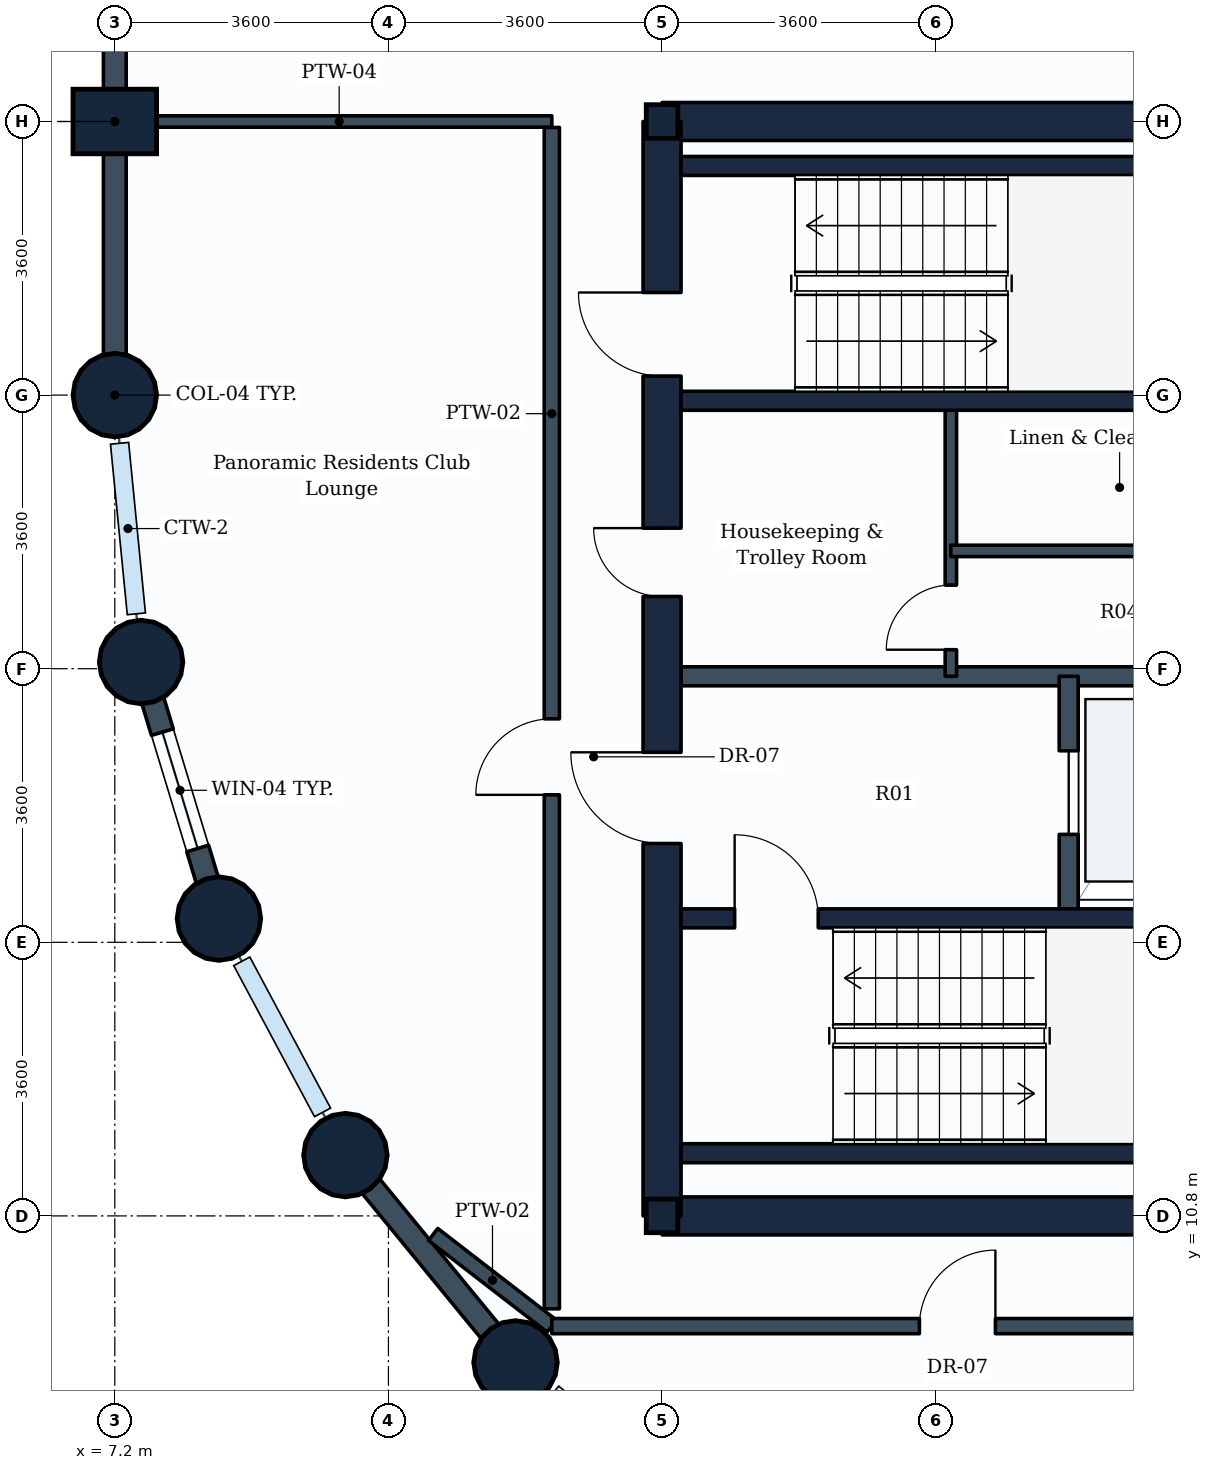
"""IFC4 building model, lengths in metres.
Left out: names, types, materials, properties, quantities, classifications, styles, units other than length and angle.
Written with IfcOpenShell. Run it as: python <this file> out.ifc"""

import sys

from ifc_helpers import new_model, si_unit, direction, frame, frame_2d, origin, origin_2d, place, context, subcontext, project, spatial, rectangle, circle, i_section, extrude, element, fill, save


model = new_model("IFC4")
c1 = context("Model", 3, precision=1e-05, world=origin(), true_north=direction((0.0, 1.0)))
c2 = subcontext(c1, "Body", "Model", "MODEL_VIEW")
j1 = project(units=[si_unit("LENGTHUNIT", "METRE"), si_unit("PLANEANGLEUNIT", "RADIAN")], contexts=[c1])
p1 = place(None, origin())
s1 = spatial("IfcSite", under=j1, at=p1, CompositionType="ELEMENT")
p2 = place(p1, origin())
s2 = spatial("IfcBuilding", under=s1, at=p2, CompositionType="ELEMENT")
p3 = place(p2, frame((0.0, 0.0, 123.8)))
s3 = spatial("IfcBuildingStorey", under=s2, at=p3, CompositionType="ELEMENT", Elevation=123.8)
p4 = place(p3, frame((7.2, 21.6, 0.0), z_axis=(0.0, 0.0, 1.0), x_axis=(1.0, 0.0, 0.0)))
e1 = element("IfcColumn", 1, at=p4, inside=s3, PredefinedType="COLUMN", context=c2, shape_type="SweptSolid", body=[
    extrude(circle(Radius=0.55, at=origin_2d()), origin(), (0.0, 0.0, 1.0), 3.8),
])
p5 = place(p3, frame((7.2, 25.2, 0.0), z_axis=(0.0, 0.0, 1.0), x_axis=(0.0, 1.0, 0.0)))
e2 = element("IfcColumn", 2, at=p5, inside=s3, PredefinedType="COLUMN", context=c2, shape_type="SweptSolid", body=[
    extrude(rectangle(XDim=0.85, YDim=1.1, at=origin_2d()), origin(), (0.0, 0.0, 1.0), 3.8),
])
for number, where, z_axis, x_axis in (
    (3, (7.546, 18.088, 0.0), (0.0, 0.0, 1.0), (1.0, 0.0, 0.0)),
    (4, (8.57, 14.712, 0.0), (0.0, 0.0, 1.0), (1.0, 0.0, 0.0)),
    (5, (10.234, 11.6, 0.0), (0.0, 0.0, 1.0), (1.0, 0.0, 0.0)),
    (6, (12.472, 8.872, 0.0), (0.0, 0.0, 1.0), (1.0, 0.0, 0.0)),
):
    element("IfcColumn", number, at=place(p3, frame(where, z_axis=z_axis, x_axis=x_axis)), inside=s3, PredefinedType="COLUMN", context=c2, shape_type="SweptSolid", body=[
        extrude(circle(Radius=0.55, at=origin_2d()), origin(), (0.0, 0.0, 1.0), 3.8),
    ])
for number, where, z_axis, x_axis in (
    (7, (14.4, 10.8, 0.0), (0.0, 0.0, 1.0), (1.0, 0.0, 0.0)),
    (8, (14.4, 25.2, 0.0), (0.0, 0.0, 1.0), (1.0, 0.0, 0.0)),
):
    element("IfcColumn", number, at=place(p3, frame(where, z_axis=z_axis, x_axis=x_axis)), inside=s3, PredefinedType="COLUMN", context=c2, shape_type="SweptSolid", body=[
        extrude(i_section(OverallWidth=0.416, OverallDepth=0.442, WebThickness=0.025, FlangeThickness=0.041, FilletRadius=0.015, at=origin_2d()), origin(), (0.0, 0.0, 1.0), 3.8),
    ])
p6 = place(p3, frame((7.2, 25.2, 0.0), z_axis=(0.0, 0.0, 1.0), x_axis=(0.0, 1.0, 0.0)))
e9 = element("IfcWall", 9, at=p6, inside=s3, PredefinedType="STANDARD", context=c2, shape_type="SweptSolid", body=[
    extrude(rectangle(XDim=3.6, YDim=0.3, at=frame_2d((1.8, 0.0))), origin(), (0.0, 0.0, 1.0), 2.93),
])
p7 = place(p3, frame((7.2, 21.6, 0.0), z_axis=(0.0, 0.0, 1.0), x_axis=(0.0, 1.0, 0.0)))
e10 = element("IfcWall", 10, at=p7, inside=s3, PredefinedType="STANDARD", context=c2, shape_type="SweptSolid", body=[
    extrude(rectangle(XDim=3.6, YDim=0.3, at=frame_2d((1.8, 0.0))), origin(), (0.0, 0.0, 1.0), 2.93),
])
p8 = place(p3, frame((8.57, 14.712, 0.0), z_axis=(0.0, 0.0, 1.0), x_axis=(-0.290305086481, 0.956934144423, 0.0)))
e11 = element("IfcWall", 11, at=p8, inside=s3, PredefinedType="STANDARD", context=c2, shape_type="SweptSolid", body=[
    extrude(rectangle(XDim=3.528, YDim=0.3, at=frame_2d((1.764, 0.0))), origin(), (0.0, 0.0, 1.0), 2.93),
])
p9 = place(p8, frame((0.964, 0.0, 0.85)))
e12 = element("IfcOpeningElement", 12, at=p9, cuts=e11, PredefinedType="OPENING", context=c2, shape_type="SweptSolid", body=[
    extrude(rectangle(XDim=1.6, YDim=1.35, at=frame_2d((0.8, 0.675))), frame((0.0, 0.16, 0.0), z_axis=(0.0, -1.0, 0.0), x_axis=(1.0, 0.0, 0.0)), (0.0, 0.0, 1.0), 0.32),
])
p10 = place(p3, frame((12.472, 8.872, 0.0), z_axis=(0.0, 0.0, 1.0), x_axis=(-0.634258295121, 0.773121216285, 0.0)))
e13 = element("IfcWall", 13, at=p10, inside=s3, PredefinedType="STANDARD", context=c2, shape_type="SweptSolid", body=[
    extrude(rectangle(XDim=3.529, YDim=0.3, at=frame_2d((1.764, 0.0))), origin(), (0.0, 0.0, 1.0), 2.93),
])
p11 = place(p3, frame((14.4, 10.8, 0.0), z_axis=(0.0, 0.0, 1.0), x_axis=(1.0, 0.0, 0.0)))
e14 = element("IfcWall", 14, at=p11, inside=s3, PredefinedType="SHEAR", context=c2, shape_type="SweptSolid", body=[
    extrude(rectangle(XDim=18.0, YDim=0.5, at=frame_2d((9.0, 0.0))), origin(), (0.0, 0.0, 1.0), 3.48),
])
p12 = place(p3, frame((14.4, 25.2, 0.0), z_axis=(0.0, 0.0, 1.0), x_axis=(1.0, 0.0, 0.0)))
e15 = element("IfcWall", 15, at=p12, inside=s3, PredefinedType="SHEAR", context=c2, shape_type="SweptSolid", body=[
    extrude(rectangle(XDim=14.4, YDim=0.5, at=frame_2d((7.2, 0.0))), origin(), (0.0, 0.0, 1.0), 3.48),
])
p13 = place(p3, frame((14.4, 10.8, 0.0), z_axis=(0.0, 0.0, 1.0), x_axis=(0.0, 1.0, 0.0)))
e16 = element("IfcWall", 16, at=p13, inside=s3, PredefinedType="SHEAR", context=c2, shape_type="SweptSolid", body=[
    extrude(rectangle(XDim=14.4, YDim=0.5, at=frame_2d((7.2, 0.0))), origin(), (0.0, 0.0, 1.0), 3.48),
])
p14 = place(p13, frame((11.05, 0.0, 0.0)))
e17 = element("IfcOpeningElement", 17, at=p14, cuts=e16, PredefinedType="OPENING", context=c2, shape_type="SweptSolid", body=[
    extrude(rectangle(XDim=1.1, YDim=2.1, at=frame_2d((0.55, 1.05))), frame((0.0, 0.26, 0.0), z_axis=(0.0, -1.0, 0.0), x_axis=(1.0, 0.0, 0.0)), (0.0, 0.0, 1.0), 0.52),
])
p15 = place(p13, frame((4.9, 0.0, 0.0)))
e18 = element("IfcOpeningElement", 18, at=p15, cuts=e16, PredefinedType="OPENING", context=c2, shape_type="SweptSolid", body=[
    extrude(rectangle(XDim=1.2, YDim=2.1, at=frame_2d((0.6, 1.05))), frame((0.0, 0.26, 0.0), z_axis=(0.0, -1.0, 0.0), x_axis=(1.0, 0.0, 0.0)), (0.0, 0.0, 1.0), 0.52),
])
p16 = place(p13, frame((8.15, 0.0, 0.0)))
e19 = element("IfcOpeningElement", 19, at=p16, cuts=e16, PredefinedType="OPENING", context=c2, shape_type="SweptSolid", body=[
    extrude(rectangle(XDim=0.9, YDim=2.1, at=frame_2d((0.45, 1.05))), frame((0.0, 0.26, 0.0), z_axis=(0.0, -1.0, 0.0), x_axis=(1.0, 0.0, 0.0)), (0.0, 0.0, 1.0), 0.52),
])
p17 = place(p3, frame((14.65, 11.625, 0.0), z_axis=(0.0, 0.0, 1.0), x_axis=(1.0, 0.0, 0.0)))
e20 = element("IfcWall", 20, at=p17, inside=s3, PredefinedType="SHEAR", context=c2, shape_type="SweptSolid", body=[
    extrude(rectangle(XDim=8.7, YDim=0.25, at=frame_2d((4.35, 0.0))), origin(), (0.0, 0.0, 1.0), 3.48),
])
p18 = place(p3, frame((14.65, 14.715, 0.0), z_axis=(0.0, 0.0, 1.0), x_axis=(1.0, 0.0, 0.0)))
e21 = element("IfcWall", 21, at=p18, inside=s3, PredefinedType="SHEAR", context=c2, shape_type="SweptSolid", body=[
    extrude(rectangle(XDim=8.7, YDim=0.25, at=frame_2d((4.35, 0.0))), origin(), (0.0, 0.0, 1.0), 3.48),
])
p19 = place(p18, frame((0.705, 0.0, 0.0)))
e22 = element("IfcOpeningElement", 22, at=p19, cuts=e21, PredefinedType="OPENING", context=c2, shape_type="SweptSolid", body=[
    extrude(rectangle(XDim=1.1, YDim=2.1, at=frame_2d((0.55, 1.05))), frame((0.0, 0.135, 0.0), z_axis=(0.0, -1.0, 0.0), x_axis=(1.0, 0.0, 0.0)), (0.0, 0.0, 1.0), 0.27),
])
for number, where, z_axis, x_axis in (
    (23, (14.65, 21.525, 0.0), (0.0, 0.0, 1.0), (1.0, 0.0, 0.0)),
    (24, (14.65, 24.615, 0.0), (0.0, 0.0, 1.0), (1.0, 0.0, 0.0)),
):
    element("IfcWall", number, at=place(p3, frame(where, z_axis=z_axis, x_axis=x_axis)), inside=s3, PredefinedType="SHEAR", context=c2, shape_type="SweptSolid", body=[
        extrude(rectangle(XDim=8.25, YDim=0.25, at=frame_2d((4.125, 0.0))), origin(), (0.0, 0.0, 1.0), 3.48),
    ])
p20 = place(p3, frame((14.65, 17.9, 0.0), z_axis=(0.0, 0.0, 1.0), x_axis=(1.0, 0.0, 0.0)))
e25 = element("IfcWall", 25, at=p20, inside=s3, PredefinedType="PARTITIONING", context=c2, shape_type="SweptSolid", body=[
    extrude(rectangle(XDim=7.15, YDim=0.25, at=frame_2d((3.575, 0.0))), origin(), (0.0, 0.0, 1.0), 3.465),
])
p21 = place(p3, frame((19.75, 14.84, 0.0), z_axis=(0.0, 0.0, 1.0), x_axis=(0.0, 1.0, 0.0)))
e26 = element("IfcWall", 26, at=p21, inside=s3, PredefinedType="PARTITIONING", context=c2, shape_type="SweptSolid", body=[
    extrude(rectangle(XDim=3.06, YDim=0.25, at=frame_2d((1.53, 0.0))), origin(), (0.0, 0.0, 1.0), 3.465),
])
p22 = place(p21, frame((0.98, 0.0, 0.0)))
e27 = element("IfcOpeningElement", 27, at=p22, cuts=e26, PredefinedType="OPENING", context=c2, shape_type="SweptSolid", body=[
    extrude(rectangle(XDim=1.1, YDim=2.1, at=frame_2d((0.55, 1.05))), frame((0.0, 0.135, 0.0), z_axis=(0.0, -1.0, 0.0), x_axis=(1.0, 0.0, 0.0)), (0.0, 0.0, 1.0), 0.27),
])
p23 = place(p3, frame((18.2, 17.9, 0.0), z_axis=(0.0, 0.0, 1.0), x_axis=(0.0, 1.0, 0.0)))
e28 = element("IfcWall", 28, at=p23, inside=s3, PredefinedType="PARTITIONING", context=c2, shape_type="SweptSolid", body=[
    extrude(rectangle(XDim=3.625, YDim=0.15, at=frame_2d((1.812, 0.0))), origin(), (0.0, 0.0, 1.0), 3.465),
])
p24 = place(p23, frame((0.35, 0.0, 0.0)))
e29 = element("IfcOpeningElement", 29, at=p24, cuts=e28, PredefinedType="OPENING", context=c2, shape_type="SweptSolid", body=[
    extrude(rectangle(XDim=0.85, YDim=2.1, at=frame_2d((0.425, 1.05))), frame((0.0, 0.085, 0.0), z_axis=(0.0, -1.0, 0.0), x_axis=(1.0, 0.0, 0.0)), (0.0, 0.0, 1.0), 0.17),
])
p25 = place(p3, frame((18.2, 19.55, 0.0), z_axis=(0.0, 0.0, 1.0), x_axis=(1.0, 0.0, 0.0)))
e30 = element("IfcWall", 30, at=p25, inside=s3, PredefinedType="PARTITIONING", context=c2, shape_type="SweptSolid", body=[
    extrude(rectangle(XDim=4.45, YDim=0.15, at=frame_2d((2.225, 0.0))), origin(), (0.0, 0.0, 1.0), 3.465),
])
p26 = place(p3, frame((7.354, 25.2, 0.0), z_axis=(0.0, 0.0, 1.0), x_axis=(1.0, 0.0, 0.0)))
e31 = element("IfcWall", 31, at=p26, inside=s3, PredefinedType="PARTITIONING", context=c2, shape_type="SweptSolid", body=[
    extrude(rectangle(XDim=5.596, YDim=0.15, at=frame_2d((2.798, 0.0))), origin(), (0.0, 0.0, 1.0), 3.465),
])
p27 = place(p3, frame((12.95, 9.35, 0.0), z_axis=(0.0, 0.0, 1.0), x_axis=(-0.7915325665, 0.611126988579, 0.0)))
e32 = element("IfcWall", 32, at=p27, inside=s3, PredefinedType="PARTITIONING", context=c2, shape_type="SweptSolid", body=[
    extrude(rectangle(XDim=1.973, YDim=0.2, at=frame_2d((0.987, 0.0))), origin(), (0.0, 0.0, 1.0), 2.93),
])
p28 = place(p3, frame((12.95, 9.577, 0.0), z_axis=(0.0, 0.0, 1.0), x_axis=(0.0, 1.0, 0.0)))
e33 = element("IfcWall", 33, at=p28, inside=s3, PredefinedType="PARTITIONING", context=c2, shape_type="SweptSolid", body=[
    extrude(rectangle(XDim=15.544, YDim=0.2, at=frame_2d((7.772, 0.0))), origin(), (0.0, 0.0, 1.0), 3.1),
])
p29 = place(p28, frame((6.763, 0.0, 0.0)))
e34 = element("IfcOpeningElement", 34, at=p29, cuts=e33, PredefinedType="OPENING", context=c2, shape_type="SweptSolid", body=[
    extrude(rectangle(XDim=1.0, YDim=2.1, at=frame_2d((0.5, 1.05))), frame((0.0, 0.11, 0.0), z_axis=(0.0, -1.0, 0.0), x_axis=(1.0, 0.0, 0.0)), (0.0, 0.0, 1.0), 0.22),
])
p30 = place(p3, frame((12.95, 9.35, 0.0), z_axis=(0.0, 0.0, 1.0), x_axis=(1.0, 0.0, 0.0)))
e35 = element("IfcWall", 35, at=p30, inside=s3, PredefinedType="PARTITIONING", context=c2, shape_type="SweptSolid", body=[
    extrude(rectangle(XDim=15.771, YDim=0.2, at=frame_2d((7.885, 0.0))), origin(), (0.0, 0.0, 1.0), 3.1),
])
p31 = place(p30, frame((4.836, 0.0, 0.0)))
e36 = element("IfcOpeningElement", 36, at=p31, cuts=e35, PredefinedType="OPENING", context=c2, shape_type="SweptSolid", body=[
    extrude(rectangle(XDim=1.0, YDim=2.1, at=frame_2d((0.5, 1.05))), frame((0.0, 0.11, 0.0), z_axis=(0.0, -1.0, 0.0), x_axis=(1.0, 0.0, 0.0)), (0.0, 0.0, 1.0), 0.22),
])
p32 = place(p9, origin())
e37 = element("IfcWindow", 37, at=p32, inside=s3, PartitioningType="SINGLE_PANEL", PredefinedType="WINDOW", context=c2, shape_type="SweptSolid", body=[
    extrude(rectangle(XDim=1.6, YDim=1.35, at=frame_2d((0.8, 0.675))), frame((0.0, 0.03, 0.0), z_axis=(0.0, -1.0, 0.0), x_axis=(1.0, 0.0, 0.0)), (0.0, 0.0, 1.0), 0.06),
])
fill(e12, e37)
p33 = place(p19, origin())
e38 = element("IfcDoor", 38, at=p33, inside=s3, OperationType="SINGLE_SWING_LEFT", PredefinedType="DOOR", context=c2, shape_type="SweptSolid", body=[
    extrude(rectangle(XDim=1.1, YDim=2.1, at=frame_2d((0.55, 1.05))), frame((0.0, 0.025, 0.0), z_axis=(0.0, -1.0, 0.0), x_axis=(1.0, 0.0, 0.0)), (0.0, 0.0, 1.0), 0.05),
])
fill(e22, e38)
p34 = place(p14, origin())
e39 = element("IfcDoor", 39, at=p34, inside=s3, OperationType="SINGLE_SWING_RIGHT", PredefinedType="DOOR", context=c2, shape_type="SweptSolid", body=[
    extrude(rectangle(XDim=1.1, YDim=2.1, at=frame_2d((0.55, 1.05))), frame((0.0, 0.025, 0.0), z_axis=(0.0, -1.0, 0.0), x_axis=(1.0, 0.0, 0.0)), (0.0, 0.0, 1.0), 0.05),
])
fill(e17, e39)
p35 = place(p22, origin())
e40 = element("IfcDoor", 40, at=p35, inside=s3, OperationType="SLIDING_TO_LEFT", PredefinedType="DOOR", context=c2, shape_type="SweptSolid", body=[
    extrude(rectangle(XDim=1.1, YDim=2.1, at=frame_2d((0.55, 1.05))), frame((0.0, 0.025, 0.0), z_axis=(0.0, -1.0, 0.0), x_axis=(1.0, 0.0, 0.0)), (0.0, 0.0, 1.0), 0.05),
])
fill(e27, e40)
p36 = place(p15, origin())
e41 = element("IfcDoor", 41, at=p36, inside=s3, OperationType="SINGLE_SWING_RIGHT", PredefinedType="DOOR", context=c2, shape_type="SweptSolid", body=[
    extrude(rectangle(XDim=1.2, YDim=2.1, at=frame_2d((0.6, 1.05))), frame((0.0, 0.025, 0.0), z_axis=(0.0, -1.0, 0.0), x_axis=(1.0, 0.0, 0.0)), (0.0, 0.0, 1.0), 0.05),
])
fill(e18, e41)
p37 = place(p16, origin())
e42 = element("IfcDoor", 42, at=p37, inside=s3, OperationType="SINGLE_SWING_RIGHT", PredefinedType="DOOR", context=c2, shape_type="SweptSolid", body=[
    extrude(rectangle(XDim=0.9, YDim=2.1, at=frame_2d((0.45, 1.05))), frame((0.0, 0.025, 0.0), z_axis=(0.0, -1.0, 0.0), x_axis=(1.0, 0.0, 0.0)), (0.0, 0.0, 1.0), 0.05),
])
fill(e19, e42)
p38 = place(p24, origin())
e43 = element("IfcDoor", 43, at=p38, inside=s3, OperationType="SINGLE_SWING_LEFT", PredefinedType="DOOR", context=c2, shape_type="SweptSolid", body=[
    extrude(rectangle(XDim=0.85, YDim=2.1, at=frame_2d((0.425, 1.05))), frame((0.0, 0.025, 0.0), z_axis=(0.0, -1.0, 0.0), x_axis=(1.0, 0.0, 0.0)), (0.0, 0.0, 1.0), 0.05),
])
fill(e29, e43)
p39 = place(p29, origin())
e44 = element("IfcDoor", 44, at=p39, inside=s3, OperationType="SINGLE_SWING_LEFT", PredefinedType="DOOR", context=c2, shape_type="SweptSolid", body=[
    extrude(rectangle(XDim=1.0, YDim=2.1, at=frame_2d((0.5, 1.05))), frame((0.0, 0.025, 0.0), z_axis=(0.0, -1.0, 0.0), x_axis=(1.0, 0.0, 0.0)), (0.0, 0.0, 1.0), 0.05),
])
fill(e34, e44)
p40 = place(p31, origin())
e45 = element("IfcDoor", 45, at=p40, inside=s3, OperationType="SINGLE_SWING_RIGHT", PredefinedType="DOOR", context=c2, shape_type="SweptSolid", body=[
    extrude(rectangle(XDim=1.0, YDim=2.1, at=frame_2d((0.5, 1.05))), frame((0.0, 0.025, 0.0), z_axis=(0.0, -1.0, 0.0), x_axis=(1.0, 0.0, 0.0)), (0.0, 0.0, 1.0), 0.05),
])
fill(e36, e45)
save(model, sys.argv[1])
